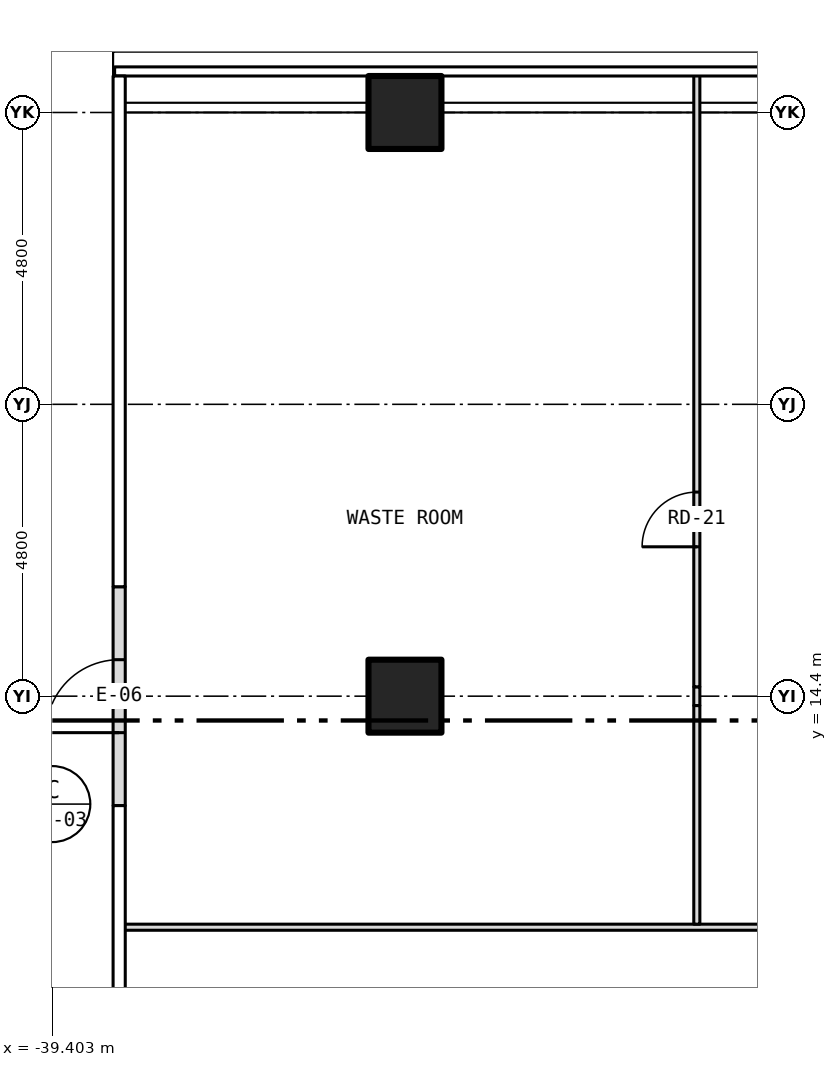
"""IFC4 building model, lengths in metres.
Left out: names, types, materials, properties, quantities, classifications, styles, units other than length and angle.
Written with IfcOpenShell. Run it as: python <this file> out.ifc"""

import sys

from ifc_helpers import new_model, si_unit, direction, frame, frame_2d, origin, origin_2d, place, context, subcontext, project, spatial, rectangle, hollow_rectangle, extrude, element, fill, save


model = new_model("IFC4")
c1 = context("Model", 3, precision=1e-05, world=origin(), true_north=direction((0.0, 1.0)))
c2 = subcontext(c1, "Body", "Model", "MODEL_VIEW")
j1 = project(units=[si_unit("LENGTHUNIT", "METRE"), si_unit("PLANEANGLEUNIT", "RADIAN")], contexts=[c1])
p1 = place(None, origin())
s1 = spatial("IfcSite", under=j1, at=p1, CompositionType="ELEMENT")
p2 = place(p1, origin())
s2 = spatial("IfcBuilding", under=s1, at=p2, CompositionType="ELEMENT")
p3 = place(p2, origin())
s3 = spatial("IfcBuildingStorey", under=s2, at=p3, CompositionType="ELEMENT", Elevation=0.0)
for number, where, z_axis, x_axis in (
    (1, (-33.6, 14.4, -0.3), (0.0, 0.0, 1.0), (1.0, 0.0, 0.0)),
    (2, (-33.6, 24.0, -0.3), (0.0, 0.0, 1.0), (1.0, 0.0, 0.0)),
):
    element("IfcColumn", number, at=place(p3, frame(where, z_axis=z_axis, x_axis=x_axis)), inside=s3, PredefinedType="COLUMN", context=c2, shape_type="SweptSolid", body=[
        extrude(hollow_rectangle(XDim=1.2, YDim=1.2, WallThickness=0.07, at=origin_2d()), origin(), (0.0, 0.0, 1.0), 7.55),
    ])
p4 = place(p3, frame((-38.3, 12.6, 0.0), z_axis=(0.0, 0.0, 1.0), x_axis=(0.0, 1.0, 0.0)))
e3 = element("IfcWall", 3, at=p4, inside=s3, PredefinedType="SOLIDWALL", context=c2, shape_type="SweptSolid", body=[
    extrude(rectangle(XDim=3.6, YDim=0.2, at=frame_2d((1.8, 0.0))), origin(), (0.0, 0.0, 1.0), 6.323),
])
p5 = place(p4, frame((1.2, 0.0, 0.0)))
e4 = element("IfcOpeningElement", 4, at=p5, cuts=e3, PredefinedType="OPENING", context=c2, shape_type="SweptSolid", body=[
    extrude(rectangle(XDim=1.2, YDim=2.4, at=frame_2d((0.6, 1.2))), frame((0.0, 0.112, 0.0), z_axis=(0.0, -1.0, 0.0), x_axis=(1.0, 0.0, 0.0)), (0.0, 0.0, 1.0), 0.224),
])
p6 = place(p3, frame((-38.28, 10.6, 0.0), z_axis=(0.0, 0.0, 1.0), x_axis=(1.0, 0.0, 0.0)))
e5 = element("IfcWall", 5, at=p6, inside=s3, PredefinedType="PARTITIONING", context=c2, shape_type="SweptSolid", body=[
    extrude(rectangle(XDim=11.28, YDim=0.1, at=frame_2d((5.64, 0.0))), origin(), (0.0, 0.0, 1.0), 7.25),
])
p7 = place(p3, frame((-28.8, 10.65, 0.0), z_axis=(0.0, 0.0, 1.0), x_axis=(0.0, 1.0, 0.0)))
e6 = element("IfcWall", 6, at=p7, inside=s3, PredefinedType="PARTITIONING", context=c2, shape_type="SweptSolid", body=[
    extrude(rectangle(XDim=3.596, YDim=0.1, at=frame_2d((1.798, 0.0))), origin(), (0.0, 0.0, 1.0), 6.633),
])
p8 = place(p3, frame((-28.8, 14.246, 0.0), z_axis=(0.0, 0.0, 1.0), x_axis=(0.0, 1.0, 0.0)))
e7 = element("IfcWall", 7, at=p8, inside=s3, PredefinedType="PARTITIONING", context=c2, shape_type="SweptSolid", body=[
    extrude(rectangle(XDim=0.308, YDim=0.1, at=frame_2d((0.154, 0.0))), origin(), (0.0, 0.0, 1.0), 7.25),
])
p9 = place(p3, frame((-28.8, 14.554, 0.0), z_axis=(0.0, 0.0, 1.0), x_axis=(0.0, 1.0, 0.0)))
e8 = element("IfcWall", 8, at=p9, inside=s3, PredefinedType="PARTITIONING", context=c2, shape_type="SweptSolid", body=[
    extrude(rectangle(XDim=10.076, YDim=0.1, at=frame_2d((5.038, 0.0))), origin(), (0.0, 0.0, 1.0), 6.633),
])
p10 = place(p9, frame((2.303, 0.0, 0.0)))
e9 = element("IfcOpeningElement", 9, at=p10, cuts=e8, PredefinedType="OPENING", context=c2, shape_type="SweptSolid", body=[
    extrude(rectangle(XDim=0.9, YDim=2.1, at=frame_2d((0.45, 1.05))), frame((0.0, 0.062, 0.0), z_axis=(0.0, -1.0, 0.0), x_axis=(1.0, 0.0, 0.0)), (0.0, 0.0, 1.0), 0.124),
])
p11 = place(p5, origin())
e10 = element("IfcDoor", 10, at=p11, inside=s3, OperationType="SINGLE_SWING_LEFT", PredefinedType="DOOR", context=c2, shape_type="SweptSolid", body=[
    extrude(rectangle(XDim=1.2, YDim=2.4, at=frame_2d((0.6, 1.2))), frame((0.0, 0.025, 0.0), z_axis=(0.0, -1.0, 0.0), x_axis=(1.0, 0.0, 0.0)), (0.0, 0.0, 1.0), 0.05),
])
fill(e4, e10)
p12 = place(p10, origin())
e11 = element("IfcDoor", 11, at=p12, inside=s3, OperationType="SINGLE_SWING_LEFT", PredefinedType="DOOR", context=c2, shape_type="SweptSolid", body=[
    extrude(rectangle(XDim=0.9, YDim=2.1, at=frame_2d((0.45, 1.05))), frame((0.0, 0.025, 0.0), z_axis=(0.0, -1.0, 0.0), x_axis=(1.0, 0.0, 0.0)), (0.0, 0.0, 1.0), 0.05),
])
fill(e9, e11)
save(model, sys.argv[1])
